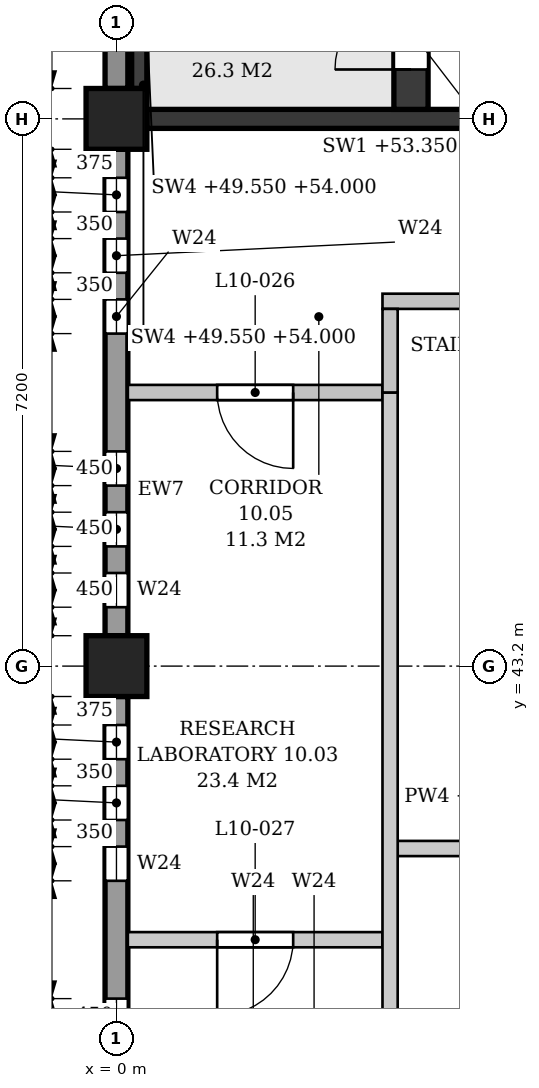
"""IFC4 building model, lengths in metres.
Left out: names, types, materials, properties, quantities, classifications, styles, units other than length and angle.
Written with IfcOpenShell. Run it as: python <this file> out.ifc"""

import sys

from ifc_helpers import new_model, si_unit, direction, frame, frame_2d, origin, origin_2d, place, context, subcontext, project, spatial, polyline, rectangle, outline, extrude, element, fill, save


model = new_model("IFC4")
c1 = context("Model", 3, precision=1e-05, world=origin(), true_north=direction((0.0, 1.0)))
c2 = subcontext(c1, "Body", "Model", "MODEL_VIEW")
j1 = project(units=[si_unit("LENGTHUNIT", "METRE"), si_unit("PLANEANGLEUNIT", "RADIAN")], contexts=[c1])
p1 = place(None, origin())
s1 = spatial("IfcSite", under=j1, at=p1, CompositionType="ELEMENT")
p2 = place(p1, origin())
s2 = spatial("IfcBuilding", under=s1, at=p2, CompositionType="ELEMENT")
p3 = place(p2, frame((0.0, 0.0, 49.8)))
s3 = spatial("IfcBuildingStorey", under=s2, at=p3, CompositionType="ELEMENT", Elevation=49.8)
for number, where, z_axis, x_axis in (
    (1, (0.0, 43.2, 0.0), (0.0, 0.0, 1.0), (1.0, 0.0, 0.0)),
    (2, (0.0, 50.4, 0.0), (0.0, 0.0, 1.0), (1.0, 0.0, 0.0)),
):
    element("IfcColumn", number, at=place(p3, frame(where, z_axis=z_axis, x_axis=x_axis)), inside=s3, PredefinedType="COLUMN", context=c2, shape_type="SweptSolid", body=[
        extrude(rectangle(XDim=0.8, YDim=0.8, at=origin_2d()), origin(), (0.0, 0.0, 1.0), 4.5),
    ])
p4 = place(p3, frame((0.0, 36.4, 0.0), z_axis=(0.0, 0.0, 1.0), x_axis=(0.0, 1.0, 0.0)))
e3 = element("IfcWall", 3, at=p4, inside=s3, PredefinedType="STANDARD", context=c2, shape_type="SweptSolid", body=[
    extrude(rectangle(XDim=6.4, YDim=0.3, at=frame_2d((3.2, 0.0))), origin(), (0.0, 0.0, 1.0), 3.6),
])
p5 = place(p4, frame((0.375, 0.0, 0.9)))
e4 = element("IfcOpeningElement", 4, at=p5, cuts=e3, PredefinedType="OPENING", context=c2, shape_type="SweptSolid", body=[
    extrude(outline(polyline([(0.0, 0.0), (0.45, 0.0), (0.45, 2.35), (0.225, 2.6), (0.0, 2.35), (0.0, 0.0)])), frame((0.0, 0.16, 0.0), z_axis=(0.0, -1.0, 0.0), x_axis=(1.0, 0.0, 0.0)), (0.0, 0.0, 1.0), 0.32),
])
p6 = place(p4, frame((1.175, 0.0, 0.9)))
e5 = element("IfcOpeningElement", 5, at=p6, cuts=e3, PredefinedType="OPENING", context=c2, shape_type="SweptSolid", body=[
    extrude(outline(polyline([(0.0, 0.0), (0.45, 0.0), (0.45, 2.35), (0.225, 2.6), (0.0, 2.35), (0.0, 0.0)])), frame((0.0, 0.16, 0.0), z_axis=(0.0, -1.0, 0.0), x_axis=(1.0, 0.0, 0.0)), (0.0, 0.0, 1.0), 0.32),
])
p7 = place(p4, frame((1.975, 0.0, 0.9)))
e6 = element("IfcOpeningElement", 6, at=p7, cuts=e3, PredefinedType="OPENING", context=c2, shape_type="SweptSolid", body=[
    extrude(outline(polyline([(0.0, 0.0), (0.45, 0.0), (0.45, 2.35), (0.225, 2.6), (0.0, 2.35), (0.0, 0.0)])), frame((0.0, 0.16, 0.0), z_axis=(0.0, -1.0, 0.0), x_axis=(1.0, 0.0, 0.0)), (0.0, 0.0, 1.0), 0.32),
])
p8 = place(p4, frame((3.975, 0.0, 0.9)))
e7 = element("IfcOpeningElement", 7, at=p8, cuts=e3, PredefinedType="OPENING", context=c2, shape_type="SweptSolid", body=[
    extrude(outline(polyline([(0.0, 0.0), (0.45, 0.0), (0.45, 2.35), (0.225, 2.6), (0.0, 2.35), (0.0, 0.0)])), frame((0.0, 0.16, 0.0), z_axis=(0.0, -1.0, 0.0), x_axis=(1.0, 0.0, 0.0)), (0.0, 0.0, 1.0), 0.32),
])
p9 = place(p4, frame((4.775, 0.0, 0.9)))
e8 = element("IfcOpeningElement", 8, at=p9, cuts=e3, PredefinedType="OPENING", context=c2, shape_type="SweptSolid", body=[
    extrude(outline(polyline([(0.0, 0.0), (0.45, 0.0), (0.45, 2.35), (0.225, 2.6), (0.0, 2.35), (0.0, 0.0)])), frame((0.0, 0.16, 0.0), z_axis=(0.0, -1.0, 0.0), x_axis=(1.0, 0.0, 0.0)), (0.0, 0.0, 1.0), 0.32),
])
p10 = place(p4, frame((5.575, 0.0, 0.9)))
e9 = element("IfcOpeningElement", 9, at=p10, cuts=e3, PredefinedType="OPENING", context=c2, shape_type="SweptSolid", body=[
    extrude(outline(polyline([(0.0, 0.0), (0.45, 0.0), (0.45, 2.35), (0.225, 2.6), (0.0, 2.35), (0.0, 0.0)])), frame((0.0, 0.16, 0.0), z_axis=(0.0, -1.0, 0.0), x_axis=(1.0, 0.0, 0.0)), (0.0, 0.0, 1.0), 0.32),
])
p11 = place(p3, frame((0.0, 43.6, 0.0), z_axis=(0.0, 0.0, 1.0), x_axis=(0.0, 1.0, 0.0)))
e10 = element("IfcWall", 10, at=p11, inside=s3, PredefinedType="STANDARD", context=c2, shape_type="SweptSolid", body=[
    extrude(rectangle(XDim=6.4, YDim=0.3, at=frame_2d((3.2, 0.0))), origin(), (0.0, 0.0, 1.0), 3.6),
])
p12 = place(p11, frame((0.375, 0.0, 0.9)))
e11 = element("IfcOpeningElement", 11, at=p12, cuts=e10, PredefinedType="OPENING", context=c2, shape_type="SweptSolid", body=[
    extrude(outline(polyline([(0.0, 0.0), (0.45, 0.0), (0.45, 2.35), (0.225, 2.6), (0.0, 2.35), (0.0, 0.0)])), frame((0.0, 0.16, 0.0), z_axis=(0.0, -1.0, 0.0), x_axis=(1.0, 0.0, 0.0)), (0.0, 0.0, 1.0), 0.32),
])
p13 = place(p11, frame((1.175, 0.0, 0.9)))
e12 = element("IfcOpeningElement", 12, at=p13, cuts=e10, PredefinedType="OPENING", context=c2, shape_type="SweptSolid", body=[
    extrude(outline(polyline([(0.0, 0.0), (0.45, 0.0), (0.45, 2.35), (0.225, 2.6), (0.0, 2.35), (0.0, 0.0)])), frame((0.0, 0.16, 0.0), z_axis=(0.0, -1.0, 0.0), x_axis=(1.0, 0.0, 0.0)), (0.0, 0.0, 1.0), 0.32),
])
p14 = place(p11, frame((1.975, 0.0, 0.9)))
e13 = element("IfcOpeningElement", 13, at=p14, cuts=e10, PredefinedType="OPENING", context=c2, shape_type="SweptSolid", body=[
    extrude(outline(polyline([(0.0, 0.0), (0.45, 0.0), (0.45, 2.35), (0.225, 2.6), (0.0, 2.35), (0.0, 0.0)])), frame((0.0, 0.16, 0.0), z_axis=(0.0, -1.0, 0.0), x_axis=(1.0, 0.0, 0.0)), (0.0, 0.0, 1.0), 0.32),
])
p15 = place(p11, frame((3.975, 0.0, 0.9)))
e14 = element("IfcOpeningElement", 14, at=p15, cuts=e10, PredefinedType="OPENING", context=c2, shape_type="SweptSolid", body=[
    extrude(outline(polyline([(0.0, 0.0), (0.45, 0.0), (0.45, 2.35), (0.225, 2.6), (0.0, 2.35), (0.0, 0.0)])), frame((0.0, 0.16, 0.0), z_axis=(0.0, -1.0, 0.0), x_axis=(1.0, 0.0, 0.0)), (0.0, 0.0, 1.0), 0.32),
])
p16 = place(p11, frame((4.775, 0.0, 0.9)))
e15 = element("IfcOpeningElement", 15, at=p16, cuts=e10, PredefinedType="OPENING", context=c2, shape_type="SweptSolid", body=[
    extrude(outline(polyline([(0.0, 0.0), (0.45, 0.0), (0.45, 2.35), (0.225, 2.6), (0.0, 2.35), (0.0, 0.0)])), frame((0.0, 0.16, 0.0), z_axis=(0.0, -1.0, 0.0), x_axis=(1.0, 0.0, 0.0)), (0.0, 0.0, 1.0), 0.32),
])
p17 = place(p11, frame((5.575, 0.0, 0.9)))
e16 = element("IfcOpeningElement", 16, at=p17, cuts=e10, PredefinedType="OPENING", context=c2, shape_type="SweptSolid", body=[
    extrude(outline(polyline([(0.0, 0.0), (0.45, 0.0), (0.45, 2.35), (0.225, 2.6), (0.0, 2.35), (0.0, 0.0)])), frame((0.0, 0.16, 0.0), z_axis=(0.0, -1.0, 0.0), x_axis=(1.0, 0.0, 0.0)), (0.0, 0.0, 1.0), 0.32),
])
p18 = place(p3, frame((0.0, 50.8, 0.0), z_axis=(0.0, 0.0, 1.0), x_axis=(0.0, 1.0, 0.0)))
e17 = element("IfcWall", 17, at=p18, inside=s3, PredefinedType="STANDARD", context=c2, shape_type="SweptSolid", body=[
    extrude(rectangle(XDim=6.4, YDim=0.3, at=frame_2d((3.2, 0.0))), origin(), (0.0, 0.0, 1.0), 3.6),
])
p19 = place(p18, frame((0.95, 0.0, 0.9)))
e18 = element("IfcOpeningElement", 18, at=p19, cuts=e17, PredefinedType="OPENING", context=c2, shape_type="SweptSolid", body=[
    extrude(outline(polyline([(0.0, 0.0), (0.9, 0.0), (0.9, 2.15), (0.45, 2.6), (0.0, 2.15), (0.0, 0.0)])), frame((0.0, 0.16, 0.0), z_axis=(0.0, -1.0, 0.0), x_axis=(1.0, 0.0, 0.0)), (0.0, 0.0, 1.0), 0.32),
])
p20 = place(p18, frame((4.55, 0.0, 0.9)))
e19 = element("IfcOpeningElement", 19, at=p20, cuts=e17, PredefinedType="OPENING", context=c2, shape_type="SweptSolid", body=[
    extrude(outline(polyline([(0.0, 0.0), (0.9, 0.0), (0.9, 2.15), (0.45, 2.6), (0.0, 2.15), (0.0, 0.0)])), frame((0.0, 0.16, 0.0), z_axis=(0.0, -1.0, 0.0), x_axis=(1.0, 0.0, 0.0)), (0.0, 0.0, 1.0), 0.32),
])
p21 = place(p3, frame((0.4, 50.4, 0.0), z_axis=(0.0, 0.0, 1.0), x_axis=(1.0, 0.0, 0.0)))
e20 = element("IfcWall", 20, at=p21, inside=s3, PredefinedType="SHEAR", context=c2, shape_type="SweptSolid", body=[
    extrude(rectangle(XDim=6.4, YDim=0.25, at=frame_2d((3.2, 0.0))), origin(), (0.0, 0.0, 1.0), 3.55),
])
p22 = place(p21, frame((4.85, 0.0, 0.0)))
e21 = element("IfcOpeningElement", 21, at=p22, cuts=e20, PredefinedType="OPENING", context=c2, shape_type="SweptSolid", body=[
    extrude(rectangle(XDim=1.1, YDim=2.1, at=frame_2d((0.55, 1.05))), frame((0.0, 0.135, 0.0), z_axis=(0.0, -1.0, 0.0), x_axis=(1.0, 0.0, 0.0)), (0.0, 0.0, 1.0), 0.27),
])
p23 = place(p3, frame((0.3, 50.8, -0.25), z_axis=(0.0, 0.0, 1.0), x_axis=(0.0, 1.0, 0.0)))
e22 = element("IfcWall", 22, at=p23, inside=s3, PredefinedType="SHEAR", context=c2, shape_type="SweptSolid", body=[
    extrude(rectangle(XDim=0.95, YDim=0.2, at=frame_2d((0.475, 0.0))), origin(), (0.0, 0.0, 1.0), 4.45),
])
p24 = place(p3, frame((3.875, 50.525, 0.0), z_axis=(0.0, 0.0, 1.0), x_axis=(0.0, 1.0, 0.0)))
e23 = element("IfcWall", 23, at=p24, inside=s3, PredefinedType="SHEAR", context=c2, shape_type="SweptSolid", body=[
    extrude(rectangle(XDim=6.925, YDim=0.45, at=frame_2d((3.462, 0.0))), origin(), (0.0, 0.0, 1.0), 4.2),
])
p25 = place(p24, frame((0.525, 0.0, 0.0)))
e24 = element("IfcOpeningElement", 24, at=p25, cuts=e23, PredefinedType="OPENING", context=c2, shape_type="SweptSolid", body=[
    extrude(rectangle(XDim=1.0, YDim=2.1, at=frame_2d((0.5, 1.05))), frame((0.0, 0.235, 0.0), z_axis=(0.0, -1.0, 0.0), x_axis=(1.0, 0.0, 0.0)), (0.0, 0.0, 1.0), 0.47),
])
p26 = place(p3, frame((0.15, 39.6, 0.0), z_axis=(0.0, 0.0, 1.0), x_axis=(1.0, 0.0, 0.0)))
e25 = element("IfcWall", 25, at=p26, inside=s3, PredefinedType="PARTITIONING", context=c2, shape_type="SweptSolid", body=[
    extrude(outline(polyline([(0.0, 0.0), (3.35, 0.0), (3.35, 4.2), (0.05, 4.2), (0.05, 3.6), (0.0, 3.6), (0.0, 0.0)])), frame((0.0, 0.1, 0.0), z_axis=(0.0, -1.0, 0.0), x_axis=(1.0, 0.0, 0.0)), (0.0, 0.0, 1.0), 0.2),
])
p27 = place(p26, frame((1.175, 0.0, 0.0)))
e26 = element("IfcOpeningElement", 26, at=p27, cuts=e25, PredefinedType="OPENING", context=c2, shape_type="SweptSolid", body=[
    extrude(rectangle(XDim=1.0, YDim=2.1, at=frame_2d((0.5, 1.05))), frame((0.0, 0.11, 0.0), z_axis=(0.0, -1.0, 0.0), x_axis=(1.0, 0.0, 0.0)), (0.0, 0.0, 1.0), 0.22),
])
p28 = place(p3, frame((3.7, 40.8, 0.0), z_axis=(0.0, 0.0, 1.0), x_axis=(1.0, 0.0, 0.0)))
e27 = element("IfcWall", 27, at=p28, inside=s3, PredefinedType="PARTITIONING", context=c2, shape_type="SweptSolid", body=[
    extrude(outline(polyline([(0.0, 0.0), (10.6, 0.0), (10.6, 3.55), (10.475, 3.55), (10.475, 4.2), (3.725, 4.2), (3.725, 3.55), (3.275, 3.55), (3.275, 4.2), (0.0, 4.2), (0.0, 0.0)])), frame((0.0, 0.1, 0.0), z_axis=(0.0, -1.0, 0.0), x_axis=(1.0, 0.0, 0.0)), (0.0, 0.0, 1.0), 0.2),
])
p29 = place(p28, frame((1.25, 0.0, 0.0)))
e28 = element("IfcOpeningElement", 28, at=p29, cuts=e27, PredefinedType="OPENING", context=c2, shape_type="SweptSolid", body=[
    extrude(rectangle(XDim=1.0, YDim=2.1, at=frame_2d((0.5, 1.05))), frame((0.0, 0.11, 0.0), z_axis=(0.0, -1.0, 0.0), x_axis=(1.0, 0.0, 0.0)), (0.0, 0.0, 1.0), 0.22),
])
p30 = place(p28, frame((6.55, 0.0, 0.0)))
e29 = element("IfcOpeningElement", 29, at=p30, cuts=e27, PredefinedType="OPENING", context=c2, shape_type="SweptSolid", body=[
    extrude(rectangle(XDim=1.0, YDim=2.1, at=frame_2d((0.5, 1.05))), frame((0.0, 0.11, 0.0), z_axis=(0.0, -1.0, 0.0), x_axis=(1.0, 0.0, 0.0)), (0.0, 0.0, 1.0), 0.22),
])
p31 = place(p3, frame((0.15, 46.8, 0.0), z_axis=(0.0, 0.0, 1.0), x_axis=(1.0, 0.0, 0.0)))
e30 = element("IfcWall", 30, at=p31, inside=s3, PredefinedType="PARTITIONING", context=c2, shape_type="SweptSolid", body=[
    extrude(outline(polyline([(0.0, 0.0), (3.35, 0.0), (3.35, 4.2), (0.05, 4.2), (0.05, 3.6), (0.0, 3.6), (0.0, 0.0)])), frame((0.0, 0.1, 0.0), z_axis=(0.0, -1.0, 0.0), x_axis=(1.0, 0.0, 0.0)), (0.0, 0.0, 1.0), 0.2),
])
p32 = place(p31, frame((1.175, 0.0, 0.0)))
e31 = element("IfcOpeningElement", 31, at=p32, cuts=e30, PredefinedType="OPENING", context=c2, shape_type="SweptSolid", body=[
    extrude(rectangle(XDim=1.0, YDim=2.1, at=frame_2d((0.5, 1.05))), frame((0.0, 0.11, 0.0), z_axis=(0.0, -1.0, 0.0), x_axis=(1.0, 0.0, 0.0)), (0.0, 0.0, 1.0), 0.22),
])
p33 = place(p3, frame((3.5, 48.0, 0.0), z_axis=(0.0, 0.0, 1.0), x_axis=(1.0, 0.0, 0.0)))
e32 = element("IfcWall", 32, at=p33, inside=s3, PredefinedType="PARTITIONING", context=c2, shape_type="SweptSolid", body=[
    extrude(outline(polyline([(0.0, 0.0), (14.6, 0.0), (14.6, 4.2), (11.125, 4.2), (11.125, 3.55), (10.675, 3.55), (10.675, 4.2), (3.925, 4.2), (3.925, 3.55), (3.475, 3.55), (3.475, 4.2), (0.0, 4.2), (0.0, 0.0)])), frame((0.0, 0.1, 0.0), z_axis=(0.0, -1.0, 0.0), x_axis=(1.0, 0.0, 0.0)), (0.0, 0.0, 1.0), 0.2),
])
p34 = place(p33, frame((5.0, 0.0, 0.0)))
e33 = element("IfcOpeningElement", 33, at=p34, cuts=e32, PredefinedType="OPENING", context=c2, shape_type="SweptSolid", body=[
    extrude(rectangle(XDim=1.0, YDim=2.1, at=frame_2d((0.5, 1.05))), frame((0.0, 0.11, 0.0), z_axis=(0.0, -1.0, 0.0), x_axis=(1.0, 0.0, 0.0)), (0.0, 0.0, 1.0), 0.22),
])
p35 = place(p3, frame((3.6, 36.15, 0.0), z_axis=(0.0, 0.0, 1.0), x_axis=(0.0, 1.0, 0.0)))
e34 = element("IfcWall", 34, at=p35, inside=s3, PredefinedType="PARTITIONING", context=c2, shape_type="SweptSolid", body=[
    extrude(outline(polyline([(0.0, 0.0), (10.65, 0.0), (10.65, 4.2), (7.275, 4.2), (7.275, 3.55), (6.825, 3.55), (6.825, 4.2), (0.05, 4.2), (0.05, 3.6), (0.0, 3.6), (0.0, 0.0)])), frame((0.0, 0.1, 0.0), z_axis=(0.0, -1.0, 0.0), x_axis=(1.0, 0.0, 0.0)), (0.0, 0.0, 1.0), 0.2),
])
p36 = place(p3, frame((3.6, 46.8, 0.0), z_axis=(0.0, 0.0, 1.0), x_axis=(0.0, 1.0, 0.0)))
e35 = element("IfcWall", 35, at=p36, inside=s3, PredefinedType="PARTITIONING", context=c2, shape_type="SweptSolid", body=[
    extrude(rectangle(XDim=1.1, YDim=0.2, at=frame_2d((0.55, 0.0))), origin(), (0.0, 0.0, 1.0), 4.2),
])
p37 = place(p7, origin())
e36 = element("IfcWindow", 36, at=p37, inside=s3, PartitioningType="SINGLE_PANEL", PredefinedType="WINDOW", context=c2, shape_type="SweptSolid", body=[
    extrude(outline(polyline([(0.0, 0.0), (0.45, 0.0), (0.45, 2.35), (0.225, 2.6), (0.0, 2.35), (0.0, 0.0)])), frame((0.0, 0.03, 0.0), z_axis=(0.0, -1.0, 0.0), x_axis=(1.0, 0.0, 0.0)), (0.0, 0.0, 1.0), 0.06),
])
fill(e6, e36)
p38 = place(p8, origin())
e37 = element("IfcWindow", 37, at=p38, inside=s3, PartitioningType="SINGLE_PANEL", PredefinedType="WINDOW", context=c2, shape_type="SweptSolid", body=[
    extrude(outline(polyline([(0.0, 0.0), (0.45, 0.0), (0.45, 2.35), (0.225, 2.6), (0.0, 2.35), (0.0, 0.0)])), frame((0.0, 0.03, 0.0), z_axis=(0.0, -1.0, 0.0), x_axis=(1.0, 0.0, 0.0)), (0.0, 0.0, 1.0), 0.06),
])
fill(e7, e37)
p39 = place(p9, origin())
e38 = element("IfcWindow", 38, at=p39, inside=s3, PartitioningType="SINGLE_PANEL", PredefinedType="WINDOW", context=c2, shape_type="SweptSolid", body=[
    extrude(outline(polyline([(0.0, 0.0), (0.45, 0.0), (0.45, 2.35), (0.225, 2.6), (0.0, 2.35), (0.0, 0.0)])), frame((0.0, 0.03, 0.0), z_axis=(0.0, -1.0, 0.0), x_axis=(1.0, 0.0, 0.0)), (0.0, 0.0, 1.0), 0.06),
])
fill(e8, e38)
p40 = place(p10, origin())
e39 = element("IfcWindow", 39, at=p40, inside=s3, PartitioningType="SINGLE_PANEL", PredefinedType="WINDOW", context=c2, shape_type="SweptSolid", body=[
    extrude(outline(polyline([(0.0, 0.0), (0.45, 0.0), (0.45, 2.35), (0.225, 2.6), (0.0, 2.35), (0.0, 0.0)])), frame((0.0, 0.03, 0.0), z_axis=(0.0, -1.0, 0.0), x_axis=(1.0, 0.0, 0.0)), (0.0, 0.0, 1.0), 0.06),
])
fill(e9, e39)
p41 = place(p12, origin())
e40 = element("IfcWindow", 40, at=p41, inside=s3, PartitioningType="SINGLE_PANEL", PredefinedType="WINDOW", context=c2, shape_type="SweptSolid", body=[
    extrude(outline(polyline([(0.0, 0.0), (0.45, 0.0), (0.45, 2.35), (0.225, 2.6), (0.0, 2.35), (0.0, 0.0)])), frame((0.0, 0.03, 0.0), z_axis=(0.0, -1.0, 0.0), x_axis=(1.0, 0.0, 0.0)), (0.0, 0.0, 1.0), 0.06),
])
fill(e11, e40)
p42 = place(p13, origin())
e41 = element("IfcWindow", 41, at=p42, inside=s3, PartitioningType="SINGLE_PANEL", PredefinedType="WINDOW", context=c2, shape_type="SweptSolid", body=[
    extrude(outline(polyline([(0.0, 0.0), (0.45, 0.0), (0.45, 2.35), (0.225, 2.6), (0.0, 2.35), (0.0, 0.0)])), frame((0.0, 0.03, 0.0), z_axis=(0.0, -1.0, 0.0), x_axis=(1.0, 0.0, 0.0)), (0.0, 0.0, 1.0), 0.06),
])
fill(e12, e41)
p43 = place(p14, origin())
e42 = element("IfcWindow", 42, at=p43, inside=s3, PartitioningType="SINGLE_PANEL", PredefinedType="WINDOW", context=c2, shape_type="SweptSolid", body=[
    extrude(outline(polyline([(0.0, 0.0), (0.45, 0.0), (0.45, 2.35), (0.225, 2.6), (0.0, 2.35), (0.0, 0.0)])), frame((0.0, 0.03, 0.0), z_axis=(0.0, -1.0, 0.0), x_axis=(1.0, 0.0, 0.0)), (0.0, 0.0, 1.0), 0.06),
])
fill(e13, e42)
p44 = place(p15, origin())
e43 = element("IfcWindow", 43, at=p44, inside=s3, PartitioningType="SINGLE_PANEL", PredefinedType="WINDOW", context=c2, shape_type="SweptSolid", body=[
    extrude(outline(polyline([(0.0, 0.0), (0.45, 0.0), (0.45, 2.35), (0.225, 2.6), (0.0, 2.35), (0.0, 0.0)])), frame((0.0, 0.03, 0.0), z_axis=(0.0, -1.0, 0.0), x_axis=(1.0, 0.0, 0.0)), (0.0, 0.0, 1.0), 0.06),
])
fill(e14, e43)
p45 = place(p16, origin())
e44 = element("IfcWindow", 44, at=p45, inside=s3, PartitioningType="SINGLE_PANEL", PredefinedType="WINDOW", context=c2, shape_type="SweptSolid", body=[
    extrude(outline(polyline([(0.0, 0.0), (0.45, 0.0), (0.45, 2.35), (0.225, 2.6), (0.0, 2.35), (0.0, 0.0)])), frame((0.0, 0.03, 0.0), z_axis=(0.0, -1.0, 0.0), x_axis=(1.0, 0.0, 0.0)), (0.0, 0.0, 1.0), 0.06),
])
fill(e15, e44)
p46 = place(p17, origin())
e45 = element("IfcWindow", 45, at=p46, inside=s3, PartitioningType="SINGLE_PANEL", PredefinedType="WINDOW", context=c2, shape_type="SweptSolid", body=[
    extrude(outline(polyline([(0.0, 0.0), (0.45, 0.0), (0.45, 2.35), (0.225, 2.6), (0.0, 2.35), (0.0, 0.0)])), frame((0.0, 0.03, 0.0), z_axis=(0.0, -1.0, 0.0), x_axis=(1.0, 0.0, 0.0)), (0.0, 0.0, 1.0), 0.06),
])
fill(e16, e45)
p47 = place(p25, origin())
e46 = element("IfcDoor", 46, at=p47, inside=s3, OperationType="SINGLE_SWING_LEFT", PredefinedType="DOOR", context=c2, shape_type="SweptSolid", body=[
    extrude(rectangle(XDim=1.0, YDim=2.1, at=frame_2d((0.5, 1.05))), frame((0.0, 0.025, 0.0), z_axis=(0.0, -1.0, 0.0), x_axis=(1.0, 0.0, 0.0)), (0.0, 0.0, 1.0), 0.05),
])
fill(e24, e46)
p48 = place(p32, frame((1.0, 0.0, 0.0), z_axis=(0.0, 0.0, 1.0), x_axis=(-1.0, 0.0, 0.0)))
e47 = element("IfcDoor", 47, at=p48, inside=s3, OperationType="SINGLE_SWING_LEFT", PredefinedType="DOOR", context=c2, shape_type="SweptSolid", body=[
    extrude(rectangle(XDim=1.0, YDim=2.1, at=frame_2d((0.5, 1.05))), frame((0.0, 0.025, 0.0), z_axis=(0.0, -1.0, 0.0), x_axis=(1.0, 0.0, 0.0)), (0.0, 0.0, 1.0), 0.05),
])
fill(e31, e47)
p49 = place(p27, frame((1.0, 0.0, 0.0), z_axis=(0.0, 0.0, 1.0), x_axis=(-1.0, 0.0, 0.0)))
e48 = element("IfcDoor", 48, at=p49, inside=s3, OperationType="SINGLE_SWING_RIGHT", PredefinedType="DOOR", context=c2, shape_type="SweptSolid", body=[
    extrude(rectangle(XDim=1.0, YDim=2.1, at=frame_2d((0.5, 1.05))), frame((0.0, 0.025, 0.0), z_axis=(0.0, -1.0, 0.0), x_axis=(1.0, 0.0, 0.0)), (0.0, 0.0, 1.0), 0.05),
])
fill(e26, e48)
save(model, sys.argv[1])
